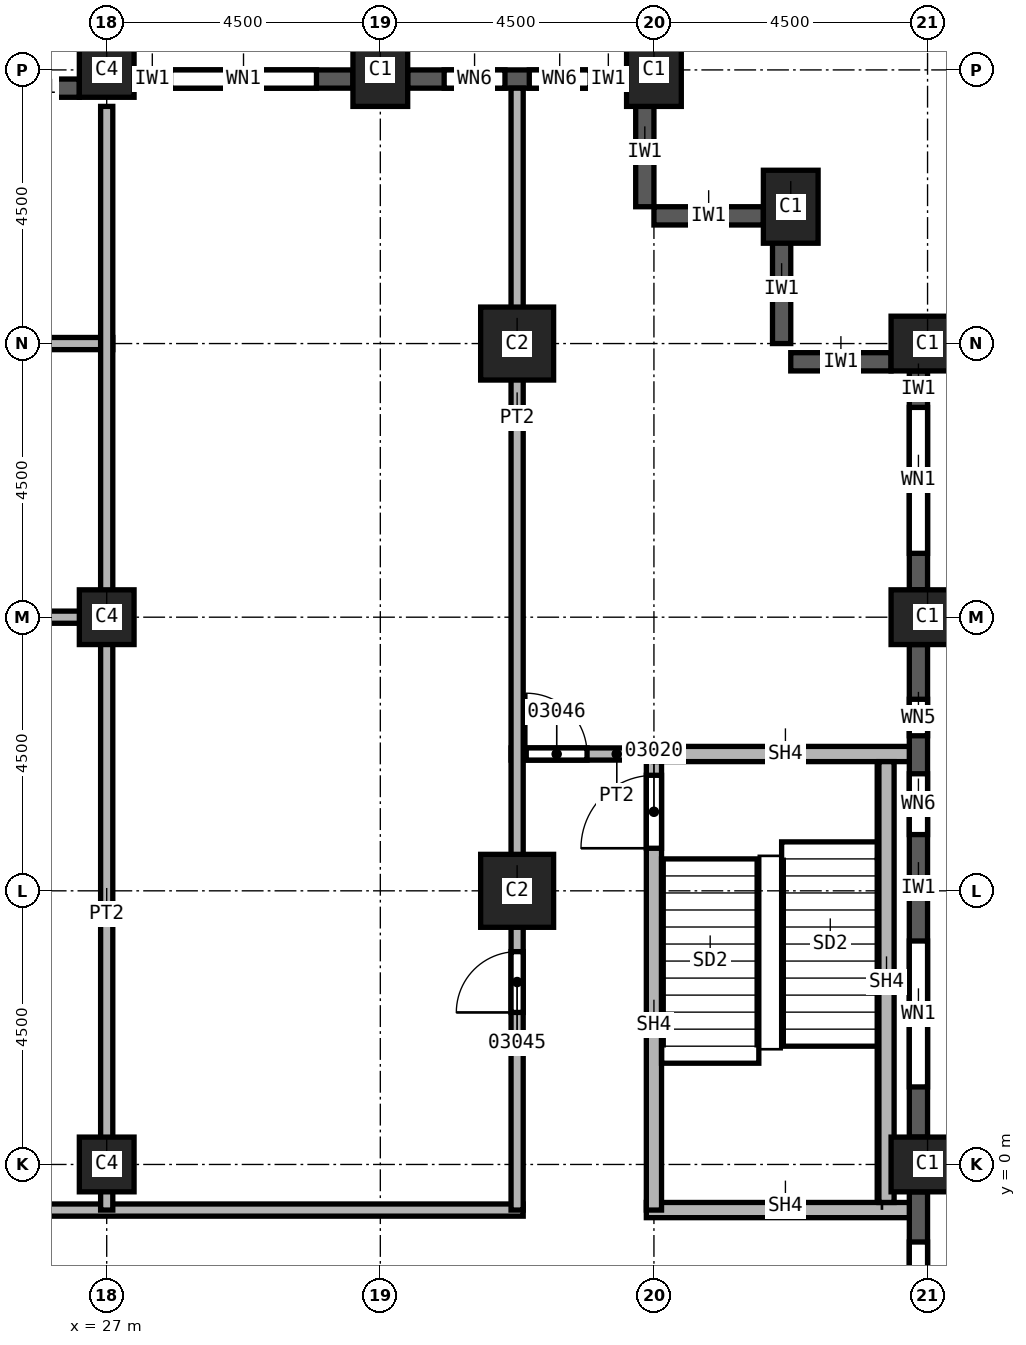
"""IFC4 building model, lengths in metres.
Left out: names, types, materials, properties, quantities, classifications, styles, units other than length and angle.
Written with IfcOpenShell. Run it as: python <this file> out.ifc"""

import sys

from ifc_helpers import new_model, si_unit, direction, frame, frame_2d, origin, origin_2d, place, context, subcontext, project, spatial, rectangle, extrude, element, fill, save


model = new_model("IFC4")
c1 = context("Model", 3, precision=1e-05, world=origin(), true_north=direction((0.0, 1.0)))
c2 = subcontext(c1, "Body", "Model", "MODEL_VIEW")
j1 = project(units=[si_unit("LENGTHUNIT", "METRE"), si_unit("PLANEANGLEUNIT", "RADIAN")], contexts=[c1])
p1 = place(None, origin())
s1 = spatial("IfcSite", under=j1, at=p1, CompositionType="ELEMENT")
p2 = place(p1, origin())
s2 = spatial("IfcBuilding", under=s1, at=p2, CompositionType="ELEMENT")
p3 = place(p2, frame((0.0, 0.0, 92.0)))
s3 = spatial("IfcBuildingStorey", under=s2, at=p3, CompositionType="ELEMENT", Elevation=92.0)
for number, where, z_axis, x_axis in (
    (1, (40.5, 0.0, 0.0), (0.0, 0.0, 1.0), (0.0, 1.0, 0.0)),
    (2, (40.5, 9.0, 0.0), (0.0, 0.0, 1.0), (0.0, 1.0, 0.0)),
    (3, (40.5, 13.5, 0.0), (0.0, 0.0, 1.0), (0.0, 1.0, 0.0)),
    (4, (38.25, 15.75, 0.0), (0.0, 0.0, 1.0), (1.0, 0.0, 0.0)),
    (5, (31.5, 18.0, 0.0), (0.0, 0.0, 1.0), (1.0, 0.0, 0.0)),
    (6, (36.0, 18.0, 0.0), (0.0, 0.0, 1.0), (1.0, 0.0, 0.0)),
):
    element("IfcColumn", number, at=place(p3, frame(where, z_axis=z_axis, x_axis=x_axis)), inside=s3, PredefinedType="COLUMN", context=c2, shape_type="SweptSolid", body=[
        extrude(rectangle(XDim=0.9, YDim=1.2, at=origin_2d()), origin(), (0.0, 0.0, 1.0), 3.7),
    ])
for number, where, z_axis, x_axis in (
    (7, (33.75, 4.5, 0.0), (0.0, 0.0, 1.0), (1.0, 0.0, 0.0)),
    (8, (33.75, 13.5, 0.0), (0.0, 0.0, 1.0), (1.0, 0.0, 0.0)),
):
    element("IfcColumn", number, at=place(p3, frame(where, z_axis=z_axis, x_axis=x_axis)), inside=s3, PredefinedType="COLUMN", context=c2, shape_type="SweptSolid", body=[
        extrude(rectangle(XDim=1.2, YDim=1.2, at=origin_2d()), origin(), (0.0, 0.0, 1.0), 3.7),
    ])
for number, where, z_axis, x_axis in (
    (9, (27.0, 0.0, 0.0), (0.0, 0.0, 1.0), (1.0, 0.0, 0.0)),
    (10, (27.0, 9.0, 0.0), (0.0, 0.0, 1.0), (1.0, 0.0, 0.0)),
    (11, (27.0, 18.0, 0.0), (0.0, 0.0, 1.0), (1.0, 0.0, 0.0)),
):
    element("IfcColumn", number, at=place(p3, frame(where, z_axis=z_axis, x_axis=x_axis)), inside=s3, PredefinedType="COLUMN", context=c2, shape_type="SweptSolid", body=[
        extrude(rectangle(XDim=0.9, YDim=0.9, at=origin_2d()), origin(), (0.0, 0.0, 1.0), 3.7),
    ])
p4 = place(p3, frame((39.9, 13.2, 0.0), z_axis=(0.0, 0.0, 1.0), x_axis=(-1.0, 0.0, 0.0)))
e12 = element("IfcWall", 12, at=p4, inside=s3, PredefinedType="SOLIDWALL", context=c2, shape_type="SweptSolid", body=[
    extrude(rectangle(XDim=1.65, YDim=0.3, at=frame_2d((0.825, 0.0))), origin(), (0.0, 0.0, 1.0), 3.1),
])
for number, where, z_axis, x_axis in (
    (13, (38.1, 15.3, 0.0), (0.0, 0.0, 1.0), (0.0, -1.0, 0.0)),
    (14, (37.8, 15.6, 0.0), (0.0, 0.0, 1.0), (-1.0, 0.0, 0.0)),
    (15, (35.85, 17.55, 0.0), (0.0, 0.0, 1.0), (0.0, -1.0, 0.0)),
):
    element("IfcWall", number, at=place(p3, frame(where, z_axis=z_axis, x_axis=x_axis)), inside=s3, PredefinedType="SOLIDWALL", context=c2, shape_type="SweptSolid", body=[
        extrude(rectangle(XDim=1.8, YDim=0.3, at=frame_2d((0.9, 0.0))), origin(), (0.0, 0.0, 1.0), 3.1),
    ])
p5 = place(p3, frame((40.35, -8.55, 0.0), z_axis=(0.0, 0.0, 1.0), x_axis=(0.0, 1.0, 0.0)))
e16 = element("IfcWall", 16, at=p5, inside=s3, PredefinedType="SOLIDWALL", context=c2, shape_type="SweptSolid", body=[
    extrude(rectangle(XDim=8.1, YDim=0.3, at=frame_2d((4.05, 0.0))), origin(), (0.0, 0.0, 1.0), 3.1),
])
p6 = place(p5, frame((0.825, 0.0, 0.8)))
e17 = element("IfcOpeningElement", 17, at=p6, cuts=e16, PredefinedType="OPENING", context=c2, shape_type="SweptSolid", body=[
    extrude(rectangle(XDim=2.4, YDim=1.95, at=frame_2d((1.2, 0.975))), frame((0.0, 0.15, 0.0), z_axis=(0.0, -1.0, 0.0), x_axis=(1.0, 0.0, 0.0)), (0.0, 0.0, 1.0), 0.3),
])
p7 = place(p5, frame((4.875, 0.0, 0.8)))
e18 = element("IfcOpeningElement", 18, at=p7, cuts=e16, PredefinedType="OPENING", context=c2, shape_type="SweptSolid", body=[
    extrude(rectangle(XDim=2.4, YDim=1.95, at=frame_2d((1.2, 0.975))), frame((0.0, 0.15, 0.0), z_axis=(0.0, -1.0, 0.0), x_axis=(1.0, 0.0, 0.0)), (0.0, 0.0, 1.0), 0.3),
])
p8 = place(p3, frame((40.35, 0.45, 0.0), z_axis=(0.0, 0.0, 1.0), x_axis=(0.0, 1.0, 0.0)))
e19 = element("IfcWall", 19, at=p8, inside=s3, PredefinedType="SOLIDWALL", context=c2, shape_type="SweptSolid", body=[
    extrude(rectangle(XDim=8.1, YDim=0.3, at=frame_2d((4.05, 0.0))), origin(), (0.0, 0.0, 1.0), 3.1),
])
p9 = place(p8, frame((0.825, 0.0, 0.8)))
e20 = element("IfcOpeningElement", 20, at=p9, cuts=e19, PredefinedType="OPENING", context=c2, shape_type="SweptSolid", body=[
    extrude(rectangle(XDim=2.4, YDim=1.95, at=frame_2d((1.2, 0.975))), frame((0.0, 0.15, 0.0), z_axis=(0.0, -1.0, 0.0), x_axis=(1.0, 0.0, 0.0)), (0.0, 0.0, 1.0), 0.3),
])
p10 = place(p8, frame((4.975, 0.0, 0.8)))
e21 = element("IfcOpeningElement", 21, at=p10, cuts=e19, PredefinedType="OPENING", context=c2, shape_type="SweptSolid", body=[
    extrude(rectangle(XDim=1.0, YDim=1.95, at=frame_2d((0.5, 0.975))), frame((0.0, 0.15, 0.0), z_axis=(0.0, -1.0, 0.0), x_axis=(1.0, 0.0, 0.0)), (0.0, 0.0, 1.0), 0.3),
])
p11 = place(p8, frame((6.6, 0.0, 0.8)))
e22 = element("IfcOpeningElement", 22, at=p11, cuts=e19, PredefinedType="OPENING", context=c2, shape_type="SweptSolid", body=[
    extrude(rectangle(XDim=0.6, YDim=1.95, at=frame_2d((0.3, 0.975))), frame((0.0, 0.15, 0.0), z_axis=(0.0, -1.0, 0.0), x_axis=(1.0, 0.0, 0.0)), (0.0, 0.0, 1.0), 0.3),
])
p12 = place(p3, frame((40.35, 9.45, 0.0), z_axis=(0.0, 0.0, 1.0), x_axis=(0.0, 1.0, 0.0)))
e23 = element("IfcWall", 23, at=p12, inside=s3, PredefinedType="SOLIDWALL", context=c2, shape_type="SweptSolid", body=[
    extrude(rectangle(XDim=3.6, YDim=0.3, at=frame_2d((1.8, 0.0))), origin(), (0.0, 0.0, 1.0), 3.1),
])
p13 = place(p12, frame((0.6, 0.0, 0.8)))
e24 = element("IfcOpeningElement", 24, at=p13, cuts=e23, PredefinedType="OPENING", context=c2, shape_type="SweptSolid", body=[
    extrude(rectangle(XDim=2.4, YDim=1.95, at=frame_2d((1.2, 0.975))), frame((0.0, 0.15, 0.0), z_axis=(0.0, -1.0, 0.0), x_axis=(1.0, 0.0, 0.0)), (0.0, 0.0, 1.0), 0.3),
])
p14 = place(p3, frame((35.55, 17.85, 0.0), z_axis=(0.0, 0.0, 1.0), x_axis=(-1.0, 0.0, 0.0)))
e25 = element("IfcWall", 25, at=p14, inside=s3, PredefinedType="SOLIDWALL", context=c2, shape_type="SweptSolid", body=[
    extrude(rectangle(XDim=3.6, YDim=0.3, at=frame_2d((1.8, 0.0))), origin(), (0.0, 0.0, 1.0), 3.1),
])
p15 = place(p14, frame((0.6, 0.0, 0.8)))
e26 = element("IfcOpeningElement", 26, at=p15, cuts=e25, PredefinedType="OPENING", context=c2, shape_type="SweptSolid", body=[
    extrude(rectangle(XDim=1.0, YDim=1.95, at=frame_2d((0.5, 0.975))), frame((0.0, 0.15, 0.0), z_axis=(0.0, -1.0, 0.0), x_axis=(1.0, 0.0, 0.0)), (0.0, 0.0, 1.0), 0.3),
])
p16 = place(p14, frame((2.0, 0.0, 0.8)))
e27 = element("IfcOpeningElement", 27, at=p16, cuts=e25, PredefinedType="OPENING", context=c2, shape_type="SweptSolid", body=[
    extrude(rectangle(XDim=1.0, YDim=1.95, at=frame_2d((0.5, 0.975))), frame((0.0, 0.15, 0.0), z_axis=(0.0, -1.0, 0.0), x_axis=(1.0, 0.0, 0.0)), (0.0, 0.0, 1.0), 0.3),
])
p17 = place(p3, frame((31.05, 17.85, 0.0), z_axis=(0.0, 0.0, 1.0), x_axis=(-1.0, 0.0, 0.0)))
e28 = element("IfcWall", 28, at=p17, inside=s3, PredefinedType="SOLIDWALL", context=c2, shape_type="SweptSolid", body=[
    extrude(rectangle(XDim=3.6, YDim=0.3, at=frame_2d((1.8, 0.0))), origin(), (0.0, 0.0, 1.0), 3.1),
])
p18 = place(p17, frame((0.6, 0.0, 0.8)))
e29 = element("IfcOpeningElement", 29, at=p18, cuts=e28, PredefinedType="OPENING", context=c2, shape_type="SweptSolid", body=[
    extrude(rectangle(XDim=2.4, YDim=1.95, at=frame_2d((1.2, 0.975))), frame((0.0, 0.15, 0.0), z_axis=(0.0, -1.0, 0.0), x_axis=(1.0, 0.0, 0.0)), (0.0, 0.0, 1.0), 0.3),
])
p19 = place(p3, frame((26.55, 17.7, 0.0), z_axis=(0.0, 0.0, 1.0), x_axis=(-1.0, 0.0, 0.0)))
e30 = element("IfcWall", 30, at=p19, inside=s3, PredefinedType="SOLIDWALL", context=c2, shape_type="SweptSolid", body=[
    extrude(rectangle(XDim=1.35, YDim=0.3, at=frame_2d((0.675, 0.0))), origin(), (0.0, 0.0, 1.0), 3.1),
])
p20 = place(p3, frame((19.9, -0.75, 0.0), z_axis=(0.0, 0.0, 1.0), x_axis=(1.0, 0.0, 0.0)))
e31 = element("IfcWall", 31, at=p20, inside=s3, PredefinedType="PARTITIONING", context=c2, shape_type="SweptSolid", body=[
    extrude(rectangle(XDim=13.95, YDim=0.2, at=frame_2d((6.975, 0.0))), origin(), (0.0, 0.0, 1.0), 3.7),
])
for number, where, z_axis, x_axis in (
    (32, (19.9, 9.0, 0.0), (0.0, 0.0, 1.0), (1.0, 0.0, 0.0)),
    (33, (19.9, 13.5, 0.0), (0.0, 0.0, 1.0), (1.0, 0.0, 0.0)),
):
    element("IfcWall", number, at=place(p3, frame(where, z_axis=z_axis, x_axis=x_axis)), inside=s3, PredefinedType="PARTITIONING", context=c2, shape_type="SweptSolid", body=[
        extrude(rectangle(XDim=7.2, YDim=0.2, at=frame_2d((3.6, 0.0))), origin(), (0.0, 0.0, 1.0), 3.7),
    ])
p21 = place(p3, frame((27.0, 17.4, 0.0), z_axis=(0.0, 0.0, 1.0), x_axis=(0.0, -1.0, 0.0)))
e34 = element("IfcWall", 34, at=p21, inside=s3, PredefinedType="PARTITIONING", context=c2, shape_type="SweptSolid", body=[
    extrude(rectangle(XDim=18.15, YDim=0.2, at=frame_2d((9.075, 0.0))), origin(), (0.0, 0.0, 1.0), 3.7),
])
p22 = place(p3, frame((33.65, 6.75, 0.0), z_axis=(0.0, 0.0, 1.0), x_axis=(1.0, 0.0, 0.0)))
e35 = element("IfcWall", 35, at=p22, inside=s3, PredefinedType="PARTITIONING", context=c2, shape_type="SweptSolid", body=[
    extrude(rectangle(XDim=2.35, YDim=0.2, at=frame_2d((1.175, 0.0))), origin(), (0.0, 0.0, 1.0), 3.7),
])
p23 = place(p22, frame((0.25, 0.0, 0.0)))
e36 = element("IfcOpeningElement", 36, at=p23, cuts=e35, PredefinedType="OPENING", context=c2, shape_type="SweptSolid", body=[
    extrude(rectangle(XDim=1.0, YDim=2.1, at=frame_2d((0.5, 1.05))), frame((0.0, 0.1, 0.0), z_axis=(0.0, -1.0, 0.0), x_axis=(1.0, 0.0, 0.0)), (0.0, 0.0, 1.0), 0.2),
])
p24 = place(p3, frame((33.75, -0.75, 0.0), z_axis=(0.0, 0.0, 1.0), x_axis=(0.0, 1.0, 0.0)))
e37 = element("IfcWall", 37, at=p24, inside=s3, PredefinedType="PARTITIONING", context=c2, shape_type="SweptSolid", body=[
    extrude(rectangle(XDim=18.45, YDim=0.2, at=frame_2d((9.225, 0.0))), origin(), (0.0, 0.0, 1.0), 3.7),
])
p25 = place(p24, frame((3.25, 0.0, 0.0)))
e38 = element("IfcOpeningElement", 38, at=p25, cuts=e37, PredefinedType="OPENING", context=c2, shape_type="SweptSolid", body=[
    extrude(rectangle(XDim=1.0, YDim=2.1, at=frame_2d((0.5, 1.05))), frame((0.0, 0.1, 0.0), z_axis=(0.0, -1.0, 0.0), x_axis=(1.0, 0.0, 0.0)), (0.0, 0.0, 1.0), 0.2),
])
p26 = place(p3, frame((35.875, -0.75, 0.0), z_axis=(0.0, 0.0, 1.0), x_axis=(1.0, 0.0, 0.0)))
e39 = element("IfcWall", 39, at=p26, inside=s3, PredefinedType="SOLIDWALL", context=c2, shape_type="SweptSolid", body=[
    extrude(rectangle(XDim=4.325, YDim=0.25, at=frame_2d((2.163, 0.0))), origin(), (0.0, 0.0, 1.0), 3.7),
])
p27 = place(p3, frame((36.0, -0.75, 0.0), z_axis=(0.0, 0.0, 1.0), x_axis=(0.0, 1.0, 0.0)))
e40 = element("IfcWall", 40, at=p27, inside=s3, PredefinedType="SOLIDWALL", context=c2, shape_type="SweptSolid", body=[
    extrude(rectangle(XDim=7.625, YDim=0.25, at=frame_2d((3.812, 0.0))), origin(), (0.0, 0.0, 1.0), 3.7),
])
p28 = place(p27, frame((5.95, 0.0, 0.0)))
e41 = element("IfcOpeningElement", 41, at=p28, cuts=e40, PredefinedType="OPENING", context=c2, shape_type="SweptSolid", body=[
    extrude(rectangle(XDim=1.2, YDim=2.1, at=frame_2d((0.6, 1.05))), frame((0.0, 0.125, 0.0), z_axis=(0.0, -1.0, 0.0), x_axis=(1.0, 0.0, 0.0)), (0.0, 0.0, 1.0), 0.25),
])
p29 = place(p3, frame((36.0, 6.75, 0.0), z_axis=(0.0, 0.0, 1.0), x_axis=(1.0, 0.0, 0.0)))
e42 = element("IfcWall", 42, at=p29, inside=s3, PredefinedType="SOLIDWALL", context=c2, shape_type="SweptSolid", body=[
    extrude(rectangle(XDim=4.2, YDim=0.25, at=frame_2d((2.1, 0.0))), origin(), (0.0, 0.0, 1.0), 3.7),
])
p30 = place(p3, frame((39.825, -0.625, 0.0), z_axis=(0.0, 0.0, 1.0), x_axis=(0.0, 1.0, 0.0)))
e43 = element("IfcWall", 43, at=p30, inside=s3, PredefinedType="SOLIDWALL", context=c2, shape_type="SweptSolid", body=[
    extrude(rectangle(XDim=7.25, YDim=0.25, at=frame_2d((3.625, 0.0))), origin(), (0.0, 0.0, 1.0), 3.7),
])
p31 = place(p7, origin())
e44 = element("IfcWindow", 44, at=p31, inside=s3, PartitioningType="SINGLE_PANEL", PredefinedType="WINDOW", context=c2, shape_type="SweptSolid", body=[
    extrude(rectangle(XDim=2.4, YDim=1.95, at=frame_2d((1.2, 0.975))), frame((0.0, 0.03, 0.0), z_axis=(0.0, -1.0, 0.0), x_axis=(1.0, 0.0, 0.0)), (0.0, 0.0, 1.0), 0.06),
])
fill(e18, e44)
p32 = place(p9, origin())
e45 = element("IfcWindow", 45, at=p32, inside=s3, PartitioningType="SINGLE_PANEL", PredefinedType="WINDOW", context=c2, shape_type="SweptSolid", body=[
    extrude(rectangle(XDim=2.4, YDim=1.95, at=frame_2d((1.2, 0.975))), frame((0.0, 0.03, 0.0), z_axis=(0.0, -1.0, 0.0), x_axis=(1.0, 0.0, 0.0)), (0.0, 0.0, 1.0), 0.06),
])
fill(e20, e45)
p33 = place(p13, origin())
e46 = element("IfcWindow", 46, at=p33, inside=s3, PartitioningType="SINGLE_PANEL", PredefinedType="WINDOW", context=c2, shape_type="SweptSolid", body=[
    extrude(rectangle(XDim=2.4, YDim=1.95, at=frame_2d((1.2, 0.975))), frame((0.0, 0.03, 0.0), z_axis=(0.0, -1.0, 0.0), x_axis=(1.0, 0.0, 0.0)), (0.0, 0.0, 1.0), 0.06),
])
fill(e24, e46)
p34 = place(p18, origin())
e47 = element("IfcWindow", 47, at=p34, inside=s3, PartitioningType="SINGLE_PANEL", PredefinedType="WINDOW", context=c2, shape_type="SweptSolid", body=[
    extrude(rectangle(XDim=2.4, YDim=1.95, at=frame_2d((1.2, 0.975))), frame((0.0, 0.03, 0.0), z_axis=(0.0, -1.0, 0.0), x_axis=(1.0, 0.0, 0.0)), (0.0, 0.0, 1.0), 0.06),
])
fill(e29, e47)
p35 = place(p28, origin())
e48 = element("IfcDoor", 48, at=p35, inside=s3, OperationType="SINGLE_SWING_LEFT", PredefinedType="DOOR", context=c2, shape_type="SweptSolid", body=[
    extrude(rectangle(XDim=1.2, YDim=2.1, at=frame_2d((0.6, 1.05))), frame((0.0, 0.025, 0.0), z_axis=(0.0, -1.0, 0.0), x_axis=(1.0, 0.0, 0.0)), (0.0, 0.0, 1.0), 0.05),
])
fill(e41, e48)
p36 = place(p25, origin())
e49 = element("IfcDoor", 49, at=p36, inside=s3, OperationType="SINGLE_SWING_RIGHT", PredefinedType="DOOR", context=c2, shape_type="SweptSolid", body=[
    extrude(rectangle(XDim=1.0, YDim=2.1, at=frame_2d((0.5, 1.05))), frame((0.0, 0.025, 0.0), z_axis=(0.0, -1.0, 0.0), x_axis=(1.0, 0.0, 0.0)), (0.0, 0.0, 1.0), 0.05),
])
fill(e38, e49)
p37 = place(p23, origin())
e50 = element("IfcDoor", 50, at=p37, inside=s3, OperationType="SINGLE_SWING_LEFT", PredefinedType="DOOR", context=c2, shape_type="SweptSolid", body=[
    extrude(rectangle(XDim=1.0, YDim=2.1, at=frame_2d((0.5, 1.05))), frame((0.0, 0.025, 0.0), z_axis=(0.0, -1.0, 0.0), x_axis=(1.0, 0.0, 0.0)), (0.0, 0.0, 1.0), 0.05),
])
fill(e36, e50)
p38 = place(p10, origin())
e51 = element("IfcWindow", 51, at=p38, inside=s3, PartitioningType="SINGLE_PANEL", PredefinedType="WINDOW", context=c2, shape_type="SweptSolid", body=[
    extrude(rectangle(XDim=1.0, YDim=1.95, at=frame_2d((0.5, 0.975))), frame((0.0, 0.03, 0.0), z_axis=(0.0, -1.0, 0.0), x_axis=(1.0, 0.0, 0.0)), (0.0, 0.0, 1.0), 0.06),
])
fill(e21, e51)
p39 = place(p11, origin())
e52 = element("IfcWindow", 52, at=p39, inside=s3, PartitioningType="SINGLE_PANEL", PredefinedType="WINDOW", context=c2, shape_type="SweptSolid", body=[
    extrude(rectangle(XDim=0.6, YDim=1.95, at=frame_2d((0.3, 0.975))), frame((0.0, 0.03, 0.0), z_axis=(0.0, -1.0, 0.0), x_axis=(1.0, 0.0, 0.0)), (0.0, 0.0, 1.0), 0.06),
])
fill(e22, e52)
p40 = place(p15, origin())
e53 = element("IfcWindow", 53, at=p40, inside=s3, PartitioningType="SINGLE_PANEL", PredefinedType="WINDOW", context=c2, shape_type="SweptSolid", body=[
    extrude(rectangle(XDim=1.0, YDim=1.95, at=frame_2d((0.5, 0.975))), frame((0.0, 0.03, 0.0), z_axis=(0.0, -1.0, 0.0), x_axis=(1.0, 0.0, 0.0)), (0.0, 0.0, 1.0), 0.06),
])
fill(e26, e53)
p41 = place(p16, origin())
e54 = element("IfcWindow", 54, at=p41, inside=s3, PartitioningType="SINGLE_PANEL", PredefinedType="WINDOW", context=c2, shape_type="SweptSolid", body=[
    extrude(rectangle(XDim=1.0, YDim=1.95, at=frame_2d((0.5, 0.975))), frame((0.0, 0.03, 0.0), z_axis=(0.0, -1.0, 0.0), x_axis=(1.0, 0.0, 0.0)), (0.0, 0.0, 1.0), 0.06),
])
fill(e27, e54)
save(model, sys.argv[1])
